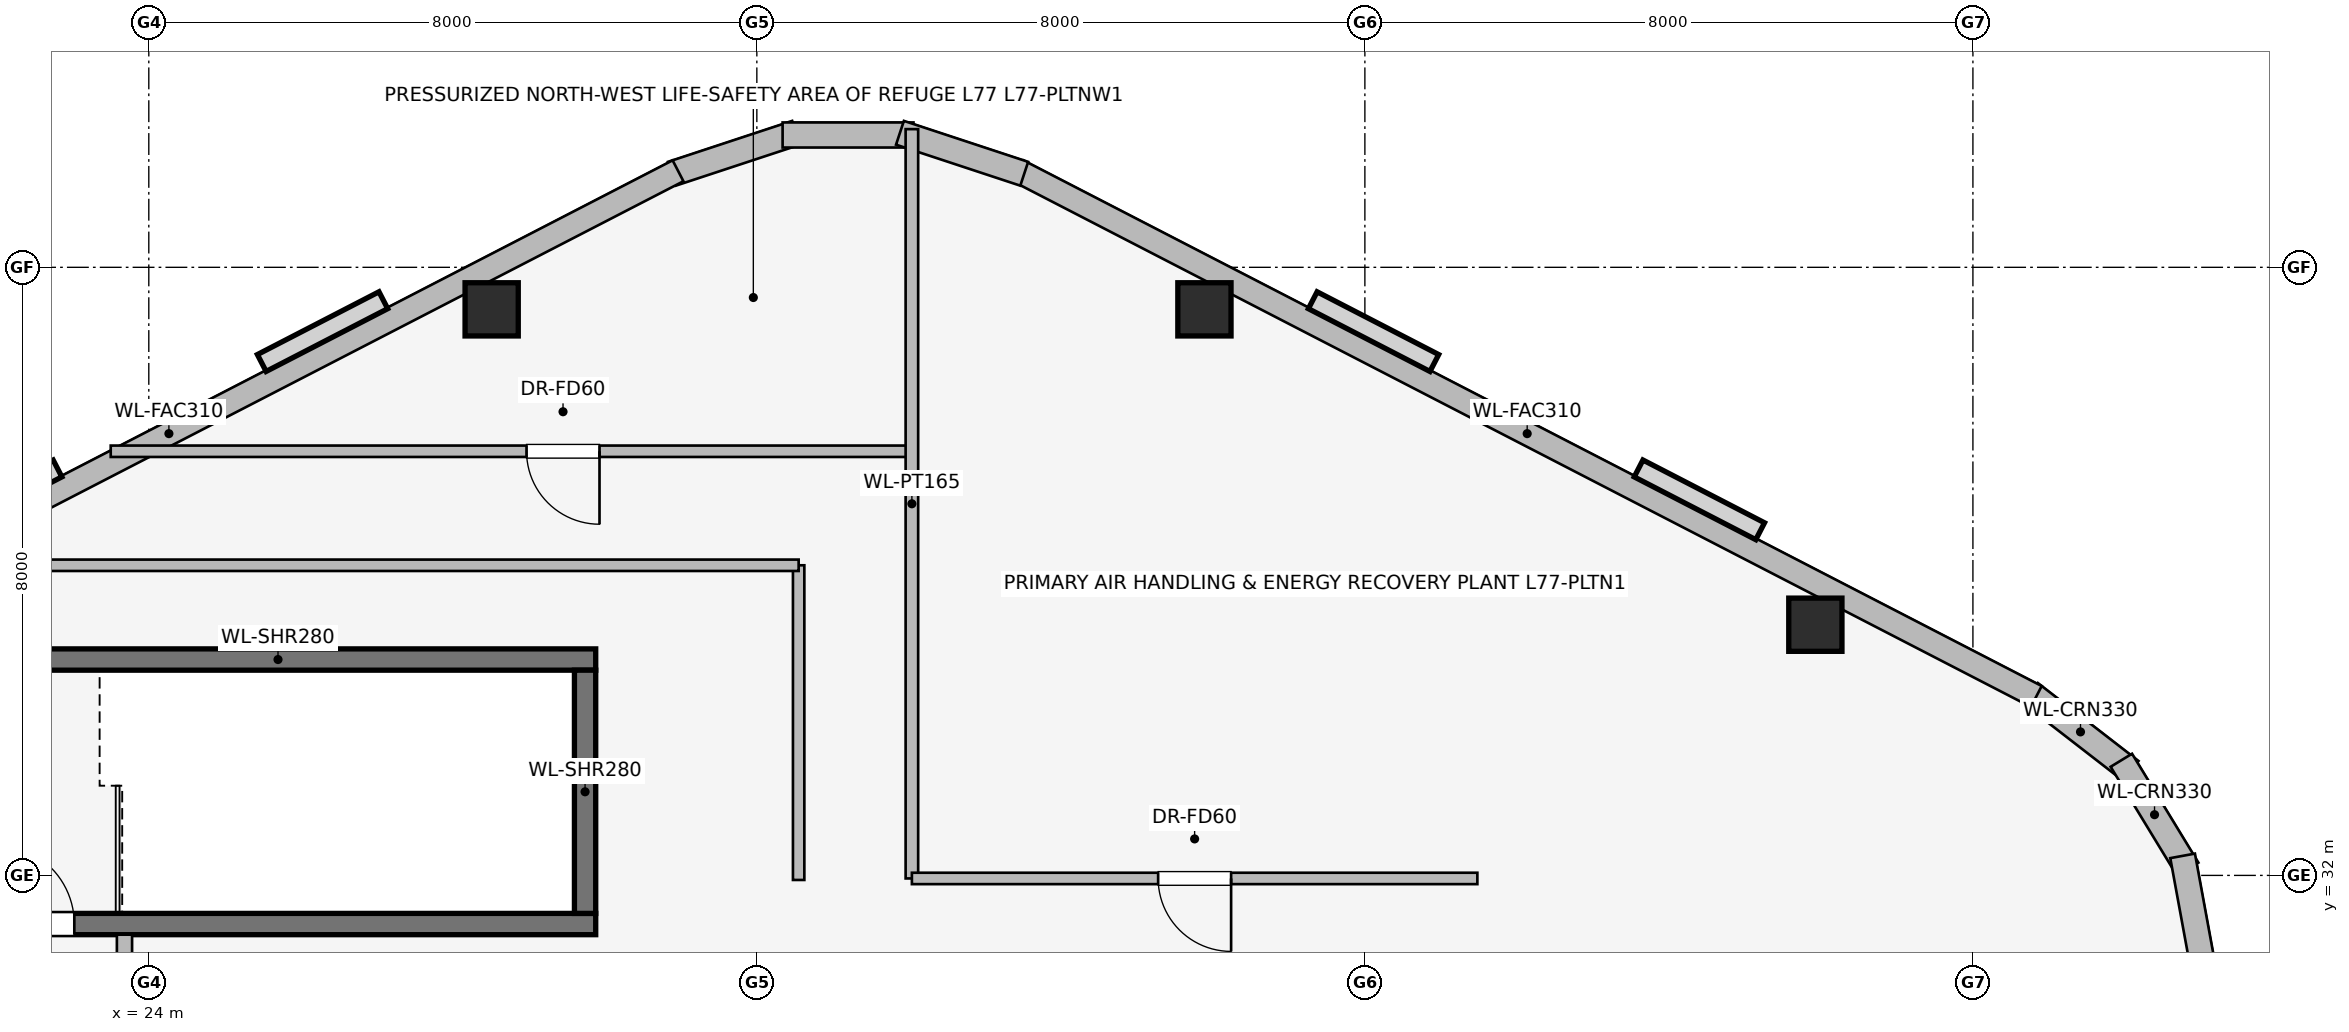
"""IFC4 building model, lengths in metres.
Left out: names, types, materials, properties, quantities, classifications, styles, units other than length and angle.
Written with IfcOpenShell. Run it as: python <this file> out.ifc"""

import sys

from ifc_helpers import new_model, si_unit, direction, frame, frame_2d, origin, origin_2d, place, context, subcontext, project, spatial, rectangle, extrude, element, fill, save


model = new_model("IFC4")
c1 = context("Model", 3, precision=1e-05, world=origin(), true_north=direction((0.0, 1.0)))
c2 = subcontext(c1, "Body", "Model", "MODEL_VIEW")
j1 = project(units=[si_unit("LENGTHUNIT", "METRE"), si_unit("PLANEANGLEUNIT", "RADIAN")], contexts=[c1])
p1 = place(None, origin())
s1 = spatial("IfcSite", under=j1, at=p1, CompositionType="ELEMENT")
p2 = place(p1, origin())
s2 = spatial("IfcBuilding", under=s1, at=p2, CompositionType="ELEMENT")
p3 = place(p2, frame((0.0, 0.0, 285.1)))
s3 = spatial("IfcBuildingStorey", under=s2, at=p3, CompositionType="ELEMENT", Elevation=285.1)
p4 = place(p3, frame((21.52, 31.36, 0.0), z_axis=(0.0, 0.0, 1.0), x_axis=(1.0, 0.0, 0.0)))
e1 = element("IfcWall", 1, at=p4, inside=s3, PredefinedType="SHEAR", context=c2, shape_type="SweptSolid", body=[
    extrude(rectangle(XDim=8.36, YDim=0.28, at=frame_2d((4.18, 0.0))), origin(), (0.0, 0.0, 1.0), 6.2),
])
p5 = place(p4, frame((0.45, 0.0, 0.0)))
e2 = element("IfcOpeningElement", 2, at=p5, cuts=e1, PredefinedType="OPENING", context=c2, shape_type="SweptSolid", body=[
    extrude(rectangle(XDim=1.05, YDim=2.0, at=frame_2d((0.525, 1.0))), frame((0.0, 0.15, 0.0), z_axis=(0.0, -1.0, 0.0), x_axis=(1.0, 0.0, 0.0)), (0.0, 0.0, 1.0), 0.3),
])
p6 = place(p3, frame((29.88, 34.84, 0.0), z_axis=(0.0, 0.0, 1.0), x_axis=(-1.0, 0.0, 0.0)))
e3 = element("IfcWall", 3, at=p6, inside=s3, PredefinedType="SHEAR", context=c2, shape_type="SweptSolid", body=[
    extrude(rectangle(XDim=8.36, YDim=0.28, at=frame_2d((4.18, 0.0))), origin(), (0.0, 0.0, 1.0), 6.2),
])
p7 = place(p3, frame((29.74, 31.5, 0.0), z_axis=(0.0, 0.0, 1.0), x_axis=(0.0, 1.0, 0.0)))
e4 = element("IfcWall", 4, at=p7, inside=s3, PredefinedType="SHEAR", context=c2, shape_type="SweptSolid", body=[
    extrude(rectangle(XDim=3.2, YDim=0.28, at=frame_2d((1.6, 0.0))), origin(), (0.0, 0.0, 1.0), 6.2),
])
for number, where, z_axis, x_axis in (
    (5, (45.927, 35.298, 0.0), (0.0, 0.0, 1.0), (1.0, 0.0, 0.0)),
    (6, (37.889, 39.447, 0.0), (0.0, 0.0, 1.0), (1.0, 0.0, 0.0)),
    (7, (28.511, 39.447, 0.0), (0.0, 0.0, 1.0), (1.0, 0.0, 0.0)),
):
    element("IfcColumn", number, at=place(p3, frame(where, z_axis=z_axis, x_axis=x_axis)), inside=s3, PredefinedType="COLUMN", context=c2, shape_type="SweptSolid", body=[
        extrude(rectangle(XDim=0.7, YDim=0.7, at=origin_2d()), origin(), (0.0, 0.0, 1.0), 6.2),
    ])
p8 = place(p3, frame((48.753, 34.401, 0.0), z_axis=(0.0, 0.0, 1.0), x_axis=(0.790691856293, -0.61221433207, 0.0)))
e8 = element("IfcWall", 8, at=p8, inside=s3, PredefinedType="STANDARD", context=c2, shape_type="SweptSolid", body=[
    extrude(rectangle(XDim=1.676, YDim=0.33, at=frame_2d((0.838, 0.0))), origin(), (0.0, 0.0, 1.0), 5.88),
])
p9 = place(p3, frame((49.953, 33.515, 0.0), z_axis=(0.0, 0.0, 1.0), x_axis=(0.520325409202, -0.853968072318, 0.0)))
e9 = element("IfcWall", 9, at=p9, inside=s3, PredefinedType="STANDARD", context=c2, shape_type="SweptSolid", body=[
    extrude(rectangle(XDim=1.678, YDim=0.33, at=frame_2d((0.839, 0.0))), origin(), (0.0, 0.0, 1.0), 5.88),
])
p10 = place(p3, frame((50.759, 32.257, 0.0), z_axis=(0.0, 0.0, 1.0), x_axis=(0.180691763044, -0.983539773862, 0.0)))
e10 = element("IfcWall", 10, at=p10, inside=s3, PredefinedType="STANDARD", context=c2, shape_type="SweptSolid", body=[
    extrude(rectangle(XDim=1.677, YDim=0.33, at=frame_2d((0.838, 0.0))), origin(), (0.0, 0.0, 1.0), 5.88),
])
p11 = place(p3, frame((35.437, 41.27, 0.0), z_axis=(0.0, 0.0, 1.0), x_axis=(0.888581481622, -0.458718814218, 0.0)))
e11 = element("IfcWall", 11, at=p11, inside=s3, PredefinedType="STANDARD", context=c2, shape_type="SweptSolid", body=[
    extrude(rectangle(XDim=15.077, YDim=0.31, at=frame_2d((7.539, 0.0))), origin(), (0.0, 0.0, 1.0), 5.88),
])
p12 = place(p3, frame((30.882, 41.231, 0.0), z_axis=(0.0, 0.0, 1.0), x_axis=(0.949713440491, 0.313120393699, 0.0)))
e12 = element("IfcWall", 12, at=p12, inside=s3, PredefinedType="STANDARD", context=c2, shape_type="SweptSolid", body=[
    extrude(rectangle(XDim=1.722, YDim=0.33, at=frame_2d((0.861, 0.0))), origin(), (0.0, 0.0, 1.0), 5.88),
])
p13 = place(p3, frame((32.339, 41.741, 0.0), z_axis=(0.0, 0.0, 1.0), x_axis=(1.0, 0.0, 0.0)))
e13 = element("IfcWall", 13, at=p13, inside=s3, PredefinedType="STANDARD", context=c2, shape_type="SweptSolid", body=[
    extrude(rectangle(XDim=1.722, YDim=0.33, at=frame_2d((0.861, 0.0))), origin(), (0.0, 0.0, 1.0), 5.88),
])
p14 = place(p3, frame((33.883, 41.77, 0.0), z_axis=(0.0, 0.0, 1.0), x_axis=(0.949713440491, -0.313120393699, 0.0)))
e14 = element("IfcWall", 14, at=p14, inside=s3, PredefinedType="STANDARD", context=c2, shape_type="SweptSolid", body=[
    extrude(rectangle(XDim=1.722, YDim=0.33, at=frame_2d((0.861, 0.0))), origin(), (0.0, 0.0, 1.0), 5.88),
])
p15 = place(p3, frame((17.566, 34.354, 0.0), z_axis=(0.0, 0.0, 1.0), x_axis=(0.888581481622, 0.458718814218, 0.0)))
e15 = element("IfcWall", 15, at=p15, inside=s3, PredefinedType="STANDARD", context=c2, shape_type="SweptSolid", body=[
    extrude(rectangle(XDim=15.077, YDim=0.31, at=frame_2d((7.539, 0.0))), origin(), (0.0, 0.0, 1.0), 5.88),
])
p16 = place(p3, frame((23.68, 25.68, 0.0), z_axis=(0.0, 0.0, 1.0), x_axis=(0.0, 1.0, 0.0)))
e16 = element("IfcWall", 16, at=p16, inside=s3, PredefinedType="PARTITIONING", context=c2, shape_type="SweptSolid", body=[
    extrude(rectangle(XDim=5.54, YDim=0.2, at=frame_2d((2.77, 0.0))), origin(), (0.0, 0.0, 1.0), 5.88),
])
p17 = place(p16, frame((1.8, 0.0, 0.0)))
e17 = element("IfcOpeningElement", 17, at=p17, cuts=e16, PredefinedType="OPENING", context=c2, shape_type="SweptSolid", body=[
    extrude(rectangle(XDim=1.05, YDim=2.0, at=frame_2d((0.525, 1.0))), frame((0.0, 0.11, 0.0), z_axis=(0.0, -1.0, 0.0), x_axis=(1.0, 0.0, 0.0)), (0.0, 0.0, 1.0), 0.22),
])
p18 = place(p3, frame((34.0, 37.58, 0.0), z_axis=(0.0, 0.0, 1.0), x_axis=(-1.0, 0.0, 0.0)))
e18 = element("IfcWall", 18, at=p18, inside=s3, PredefinedType="PARTITIONING", context=c2, shape_type="SweptSolid", body=[
    extrude(rectangle(XDim=10.501, YDim=0.15, at=frame_2d((5.25, 0.0))), origin(), (0.0, 0.0, 1.0), 5.88),
])
p19 = place(p18, frame((4.07, 0.0, 0.0)))
e19 = element("IfcOpeningElement", 19, at=p19, cuts=e18, PredefinedType="OPENING", context=c2, shape_type="SweptSolid", body=[
    extrude(rectangle(XDim=0.96, YDim=2.0, at=frame_2d((0.48, 1.0))), frame((0.0, 0.085, 0.0), z_axis=(0.0, -1.0, 0.0), x_axis=(1.0, 0.0, 0.0)), (0.0, 0.0, 1.0), 0.17),
])
p20 = place(p3, frame((34.04, 31.96, 0.0), z_axis=(0.0, 0.0, 1.0), x_axis=(0.0, 1.0, 0.0)))
e20 = element("IfcWall", 20, at=p20, inside=s3, PredefinedType="PARTITIONING", context=c2, shape_type="SweptSolid", body=[
    extrude(rectangle(XDim=9.858, YDim=0.165, at=frame_2d((4.929, 0.0))), origin(), (0.0, 0.0, 1.0), 5.88),
])
p21 = place(p3, frame((41.48, 31.96, 0.0), z_axis=(0.0, 0.0, 1.0), x_axis=(-1.0, 0.0, 0.0)))
e21 = element("IfcWall", 21, at=p21, inside=s3, PredefinedType="PARTITIONING", context=c2, shape_type="SweptSolid", body=[
    extrude(rectangle(XDim=7.44, YDim=0.15, at=frame_2d((3.72, 0.0))), origin(), (0.0, 0.0, 1.0), 5.272),
])
p22 = place(p21, frame((3.24, 0.0, 0.0)))
e22 = element("IfcOpeningElement", 22, at=p22, cuts=e21, PredefinedType="OPENING", context=c2, shape_type="SweptSolid", body=[
    extrude(rectangle(XDim=0.96, YDim=2.0, at=frame_2d((0.48, 1.0))), frame((0.0, 0.085, 0.0), z_axis=(0.0, -1.0, 0.0), x_axis=(1.0, 0.0, 0.0)), (0.0, 0.0, 1.0), 0.17),
])
p23 = place(p3, frame((32.55, 31.94, 0.0), z_axis=(0.0, 0.0, 1.0), x_axis=(0.0, 1.0, 0.0)))
e23 = element("IfcWall", 23, at=p23, inside=s3, PredefinedType="PARTITIONING", context=c2, shape_type="SweptSolid", body=[
    extrude(rectangle(XDim=4.14, YDim=0.15, at=frame_2d((2.07, 0.0))), origin(), (0.0, 0.0, 1.0), 5.88),
])
p24 = place(p3, frame((32.55, 36.08, 0.0), z_axis=(0.0, 0.0, 1.0), x_axis=(-1.0, 0.0, 0.0)))
e24 = element("IfcWall", 24, at=p24, inside=s3, PredefinedType="PARTITIONING", context=c2, shape_type="SweptSolid", body=[
    extrude(rectangle(XDim=10.15, YDim=0.15, at=frame_2d((5.075, 0.0))), origin(), (0.0, 0.0, 1.0), 5.88),
])
p25 = place(p5, origin())
e25 = element("IfcDoor", 25, at=p25, inside=s3, OperationType="SINGLE_SWING_LEFT", PredefinedType="DOOR", context=c2, shape_type="SweptSolid", body=[
    extrude(rectangle(XDim=1.05, YDim=2.0, at=frame_2d((0.525, 1.0))), frame((0.0, 0.025, 0.0), z_axis=(0.0, -1.0, 0.0), x_axis=(1.0, 0.0, 0.0)), (0.0, 0.0, 1.0), 0.05),
])
fill(e2, e25)
p26 = place(p19, origin())
e26 = element("IfcDoor", 26, at=p26, inside=s3, OperationType="SINGLE_SWING_LEFT", PredefinedType="DOOR", context=c2, shape_type="SweptSolid", body=[
    extrude(rectangle(XDim=0.96, YDim=2.0, at=frame_2d((0.48, 1.0))), frame((0.0, 0.025, 0.0), z_axis=(0.0, -1.0, 0.0), x_axis=(1.0, 0.0, 0.0)), (0.0, 0.0, 1.0), 0.05),
])
fill(e19, e26)
p27 = place(p22, origin())
e27 = element("IfcDoor", 27, at=p27, inside=s3, OperationType="SINGLE_SWING_LEFT", PredefinedType="DOOR", context=c2, shape_type="SweptSolid", body=[
    extrude(rectangle(XDim=0.96, YDim=2.0, at=frame_2d((0.48, 1.0))), frame((0.0, 0.025, 0.0), z_axis=(0.0, -1.0, 0.0), x_axis=(1.0, 0.0, 0.0)), (0.0, 0.0, 1.0), 0.05),
])
fill(e22, e27)
save(model, sys.argv[1])
